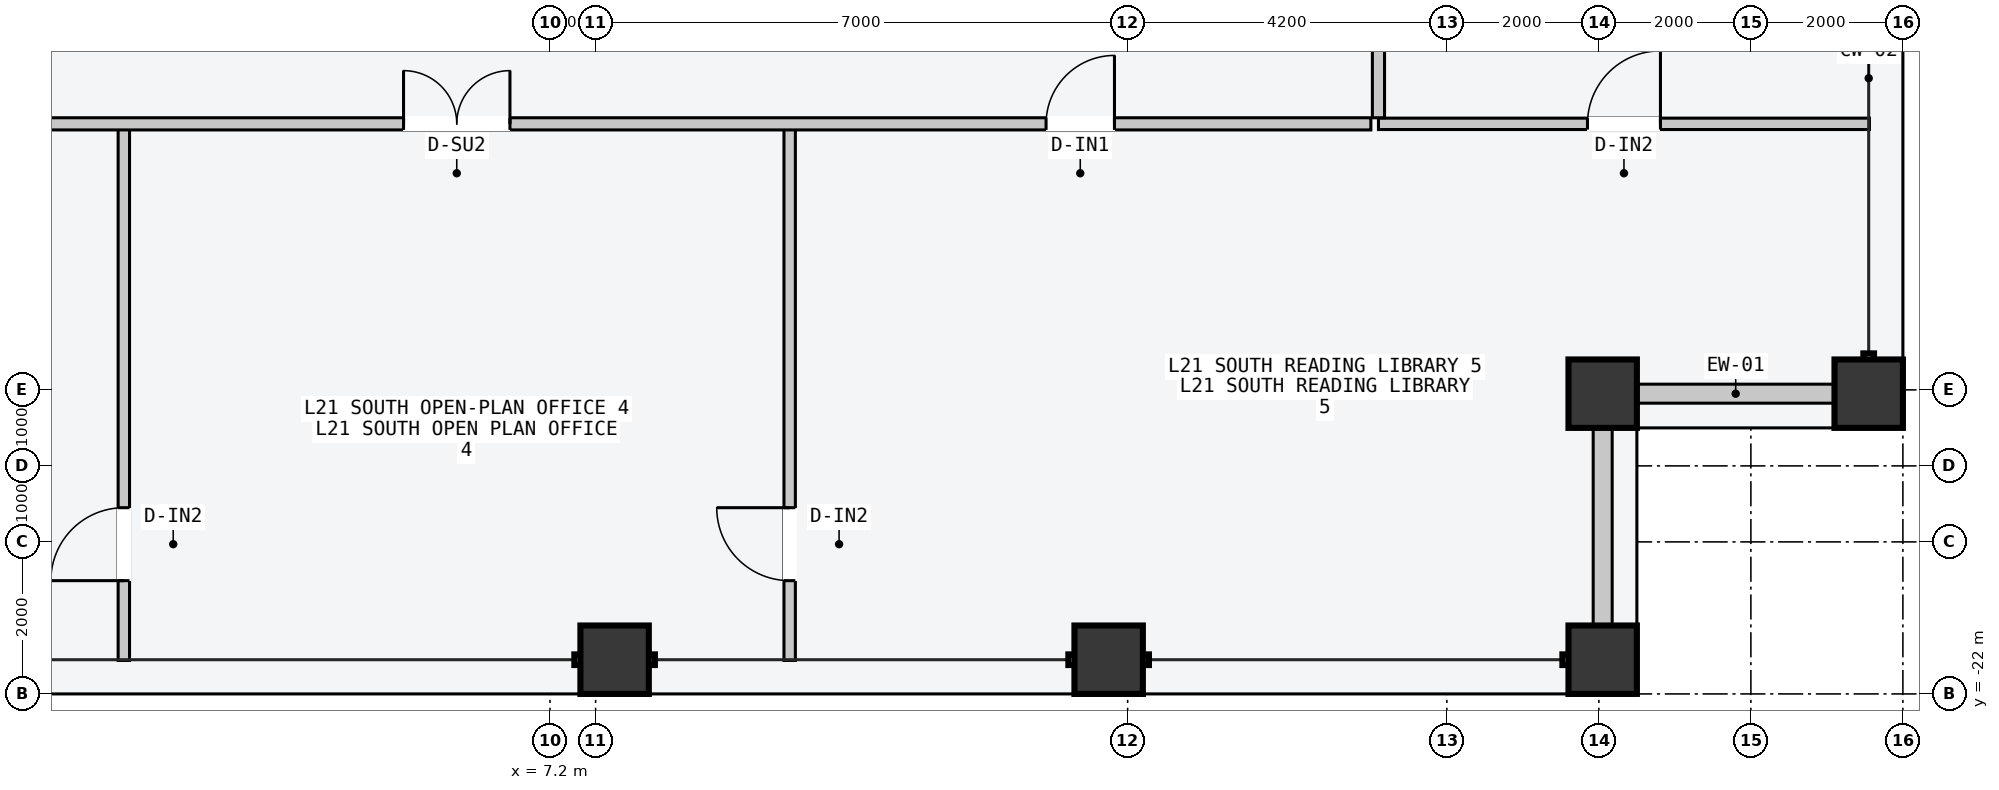
"""IFC4 building model, lengths in metres.
Left out: names, types, materials, properties, quantities, classifications, styles, units other than length and angle.
Written with IfcOpenShell. Run it as: python <this file> out.ifc"""

import sys

from ifc_helpers import new_model, si_unit, direction, frame, frame_2d, origin, origin_2d, place, context, subcontext, project, spatial, rectangle, hollow_rectangle, extrude, element, fill, save


model = new_model("IFC4")
c1 = context("Model", 3, precision=1e-05, world=origin(), true_north=direction((0.0, 1.0)))
c2 = subcontext(c1, "Body", "Model", "MODEL_VIEW")
j1 = project(units=[si_unit("LENGTHUNIT", "METRE"), si_unit("PLANEANGLEUNIT", "RADIAN")], contexts=[c1])
p1 = place(None, origin())
s1 = spatial("IfcSite", under=j1, at=p1, CompositionType="ELEMENT")
p2 = place(p1, origin())
s2 = spatial("IfcBuilding", under=s1, at=p2, CompositionType="ELEMENT")
p3 = place(p2, frame((0.0, 0.0, 82.8)))
s3 = spatial("IfcBuildingStorey", under=s2, at=p3, CompositionType="ELEMENT", Elevation=82.8)
for number, where, z_axis, x_axis in (
    (1, (8.05, -21.55, 0.0), (0.0, 0.0, 1.0), (1.0, 0.0, 0.0)),
    (2, (14.55, -21.55, 0.0), (0.0, 0.0, 1.0), (1.0, 0.0, 0.0)),
    (3, (21.05, -21.55, 0.0), (0.0, 0.0, 1.0), (1.0, 0.0, 0.0)),
    (4, (24.55, -18.05, 0.0), (0.0, 0.0, 1.0), (0.0, 1.0, 0.0)),
    (5, (21.05, -18.05, 0.0), (0.0, 0.0, 1.0), (1.0, 0.0, 0.0)),
):
    element("IfcColumn", number, at=place(p3, frame(where, z_axis=z_axis, x_axis=x_axis)), inside=s3, PredefinedType="COLUMN", context=c2, shape_type="SweptSolid", body=[
        extrude(hollow_rectangle(XDim=0.9, YDim=0.9, WallThickness=0.045, at=origin_2d()), origin(), (0.0, 0.0, 1.0), 4.5),
    ])
for number, where, z_axis, x_axis in (
    (6, (21.51, -18.05, 0.0), (0.0, 0.0, 1.0), (1.0, 0.0, 0.0)),
    (7, (21.05, -21.09, 0.0), (0.0, 0.0, 1.0), (0.0, 1.0, 0.0)),
):
    element("IfcWall", number, at=place(p3, frame(where, z_axis=z_axis, x_axis=x_axis)), inside=s3, PredefinedType="STANDARD", context=c2, shape_type="SweptSolid", body=[
        extrude(rectangle(XDim=2.58, YDim=0.25, at=frame_2d((1.29, 0.0))), origin(), (0.0, 0.0, 1.0), 2.64),
    ])
p4 = place(p3, frame((1.593, -21.56, 0.0), z_axis=(0.0, 0.0, 1.0), x_axis=(0.0, 1.0, 0.0)))
e8 = element("IfcWall", 8, at=p4, inside=s3, PredefinedType="PARTITIONING", context=c2, shape_type="SweptSolid", body=[
    extrude(rectangle(XDim=7.0, YDim=0.15, at=frame_2d((3.5, 0.0))), origin(), (0.0, 0.0, 1.0), 4.3),
])
p5 = place(p4, frame((1.05, 0.0, 0.0)))
e9 = element("IfcOpeningElement", 9, at=p5, cuts=e8, PredefinedType="OPENING", context=c2, shape_type="SweptSolid", body=[
    extrude(rectangle(XDim=0.96, YDim=2.18, at=frame_2d((0.48, 1.09))), frame((0.0, 0.085, 0.0), z_axis=(0.0, -1.0, 0.0), x_axis=(1.0, 0.0, 0.0)), (0.0, 0.0, 1.0), 0.17),
])
p6 = place(p3, frame((10.353, -21.56, 0.0), z_axis=(0.0, 0.0, 1.0), x_axis=(0.0, 1.0, 0.0)))
e10 = element("IfcWall", 10, at=p6, inside=s3, PredefinedType="PARTITIONING", context=c2, shape_type="SweptSolid", body=[
    extrude(rectangle(XDim=7.0, YDim=0.15, at=frame_2d((3.5, 0.0))), origin(), (0.0, 0.0, 1.0), 4.3),
])
p7 = place(p6, frame((1.05, 0.0, 0.0)))
e11 = element("IfcOpeningElement", 11, at=p7, cuts=e10, PredefinedType="OPENING", context=c2, shape_type="SweptSolid", body=[
    extrude(rectangle(XDim=0.96, YDim=2.18, at=frame_2d((0.48, 1.09))), frame((0.0, 0.085, 0.0), z_axis=(0.0, -1.0, 0.0), x_axis=(1.0, 0.0, 0.0)), (0.0, 0.0, 1.0), 0.17),
])
p8 = place(p3, frame((-18.0, -14.5, 0.0), z_axis=(0.0, 0.0, 1.0), x_axis=(1.0, 0.0, 0.0)))
e12 = element("IfcWall", 12, at=p8, inside=s3, PredefinedType="PARTITIONING", context=c2, shape_type="SweptSolid", body=[
    extrude(rectangle(XDim=36.0, YDim=0.16, at=frame_2d((18.0, 0.0))), origin(), (0.0, 0.0, 1.0), 4.3),
])
p9 = place(p8, frame((1.721, 0.0, 0.0)))
e13 = element("IfcOpeningElement", 13, at=p9, cuts=e12, PredefinedType="OPENING", context=c2, shape_type="SweptSolid", body=[
    extrude(rectangle(XDim=1.02, YDim=2.2, at=frame_2d((0.51, 1.1))), frame((0.0, 0.09, 0.0), z_axis=(0.0, -1.0, 0.0), x_axis=(1.0, 0.0, 0.0)), (0.0, 0.0, 1.0), 0.18),
])
p10 = place(p8, frame((7.515, 0.0, 0.0)))
e14 = element("IfcOpeningElement", 14, at=p10, cuts=e12, PredefinedType="OPENING", context=c2, shape_type="SweptSolid", body=[
    extrude(rectangle(XDim=1.06, YDim=2.2, at=frame_2d((0.53, 1.1))), frame((0.0, 0.09, 0.0), z_axis=(0.0, -1.0, 0.0), x_axis=(1.0, 0.0, 0.0)), (0.0, 0.0, 1.0), 0.18),
])
p11 = place(p8, frame((14.991, 0.0, 0.0)))
e15 = element("IfcOpeningElement", 15, at=p11, cuts=e12, PredefinedType="OPENING", context=c2, shape_type="SweptSolid", body=[
    extrude(rectangle(XDim=1.24, YDim=2.24, at=frame_2d((0.62, 1.12))), frame((0.0, 0.09, 0.0), z_axis=(0.0, -1.0, 0.0), x_axis=(1.0, 0.0, 0.0)), (0.0, 0.0, 1.0), 0.18),
])
p12 = place(p8, frame((23.273, 0.0, 0.0)))
e16 = element("IfcOpeningElement", 16, at=p12, cuts=e12, PredefinedType="OPENING", context=c2, shape_type="SweptSolid", body=[
    extrude(rectangle(XDim=1.4, YDim=2.2, at=frame_2d((0.7, 1.1))), frame((0.0, 0.09, 0.0), z_axis=(0.0, -1.0, 0.0), x_axis=(1.0, 0.0, 0.0)), (0.0, 0.0, 1.0), 0.18),
])
p13 = place(p8, frame((31.727, 0.0, 0.0)))
e17 = element("IfcOpeningElement", 17, at=p13, cuts=e12, PredefinedType="OPENING", context=c2, shape_type="SweptSolid", body=[
    extrude(rectangle(XDim=0.9, YDim=2.15, at=frame_2d((0.45, 1.075))), frame((0.0, 0.09, 0.0), z_axis=(0.0, -1.0, 0.0), x_axis=(1.0, 0.0, 0.0)), (0.0, 0.0, 1.0), 0.18),
])
p14 = place(p3, frame((18.1, -14.5, 0.0), z_axis=(0.0, 0.0, 1.0), x_axis=(1.0, 0.0, 0.0)))
e18 = element("IfcWall", 18, at=p14, inside=s3, PredefinedType="PARTITIONING", context=c2, shape_type="SweptSolid", body=[
    extrude(rectangle(XDim=6.46, YDim=0.15, at=frame_2d((3.23, 0.0))), origin(), (0.0, 0.0, 1.0), 4.3),
])
p15 = place(p14, frame((2.75, 0.0, 0.0)))
e19 = element("IfcOpeningElement", 19, at=p15, cuts=e18, PredefinedType="OPENING", context=c2, shape_type="SweptSolid", body=[
    extrude(rectangle(XDim=0.96, YDim=2.18, at=frame_2d((0.48, 1.09))), frame((0.0, 0.085, 0.0), z_axis=(0.0, -1.0, 0.0), x_axis=(1.0, 0.0, 0.0)), (0.0, 0.0, 1.0), 0.17),
])
p16 = place(p3, frame((18.1, -14.42, 0.0), z_axis=(0.0, 0.0, 1.0), x_axis=(0.0, 1.0, 0.0)))
e20 = element("IfcWall", 20, at=p16, inside=s3, PredefinedType="PARTITIONING", context=c2, shape_type="SweptSolid", body=[
    extrude(rectangle(XDim=28.84, YDim=0.16, at=frame_2d((14.42, 0.0))), origin(), (0.0, 0.0, 1.0), 2.64),
])
p17 = place(p16, frame((13.97, 0.0, 0.0)))
e21 = element("IfcOpeningElement", 21, at=p17, cuts=e20, PredefinedType="OPENING", context=c2, shape_type="SweptSolid", body=[
    extrude(rectangle(XDim=0.9, YDim=2.15, at=frame_2d((0.45, 1.075))), frame((0.0, 0.09, 0.0), z_axis=(0.0, -1.0, 0.0), x_axis=(1.0, 0.0, 0.0)), (0.0, 0.0, 1.0), 0.18),
])
p18 = place(p5, origin())
e22 = element("IfcDoor", 22, at=p18, inside=s3, OperationType="SINGLE_SWING_LEFT", PredefinedType="DOOR", context=c2, shape_type="SweptSolid", body=[
    extrude(rectangle(XDim=0.96, YDim=2.18, at=frame_2d((0.48, 1.09))), frame((0.0, 0.025, 0.0), z_axis=(0.0, -1.0, 0.0), x_axis=(1.0, 0.0, 0.0)), (0.0, 0.0, 1.0), 0.05),
])
fill(e9, e22)
p19 = place(p7, origin())
e23 = element("IfcDoor", 23, at=p19, inside=s3, OperationType="SINGLE_SWING_RIGHT", PredefinedType="DOOR", context=c2, shape_type="SweptSolid", body=[
    extrude(rectangle(XDim=0.96, YDim=2.18, at=frame_2d((0.48, 1.09))), frame((0.0, 0.025, 0.0), z_axis=(0.0, -1.0, 0.0), x_axis=(1.0, 0.0, 0.0)), (0.0, 0.0, 1.0), 0.05),
])
fill(e11, e23)
p20 = place(p12, origin())
e24 = element("IfcDoor", 24, at=p20, inside=s3, OperationType="DOUBLE_DOOR_SINGLE_SWING", PredefinedType="DOOR", context=c2, shape_type="SweptSolid", body=[
    extrude(rectangle(XDim=1.4, YDim=2.2, at=frame_2d((0.7, 1.1))), frame((0.0, 0.025, 0.0), z_axis=(0.0, -1.0, 0.0), x_axis=(1.0, 0.0, 0.0)), (0.0, 0.0, 1.0), 0.05),
])
fill(e16, e24)
p21 = place(p13, origin())
e25 = element("IfcDoor", 25, at=p21, inside=s3, OperationType="SINGLE_SWING_RIGHT", PredefinedType="DOOR", context=c2, shape_type="SweptSolid", body=[
    extrude(rectangle(XDim=0.9, YDim=2.15, at=frame_2d((0.45, 1.075))), frame((0.0, 0.025, 0.0), z_axis=(0.0, -1.0, 0.0), x_axis=(1.0, 0.0, 0.0)), (0.0, 0.0, 1.0), 0.05),
])
fill(e17, e25)
p22 = place(p15, origin())
e26 = element("IfcDoor", 26, at=p22, inside=s3, OperationType="SINGLE_SWING_RIGHT", PredefinedType="DOOR", context=c2, shape_type="SweptSolid", body=[
    extrude(rectangle(XDim=0.96, YDim=2.18, at=frame_2d((0.48, 1.09))), frame((0.0, 0.025, 0.0), z_axis=(0.0, -1.0, 0.0), x_axis=(1.0, 0.0, 0.0)), (0.0, 0.0, 1.0), 0.05),
])
fill(e19, e26)
save(model, sys.argv[1])
